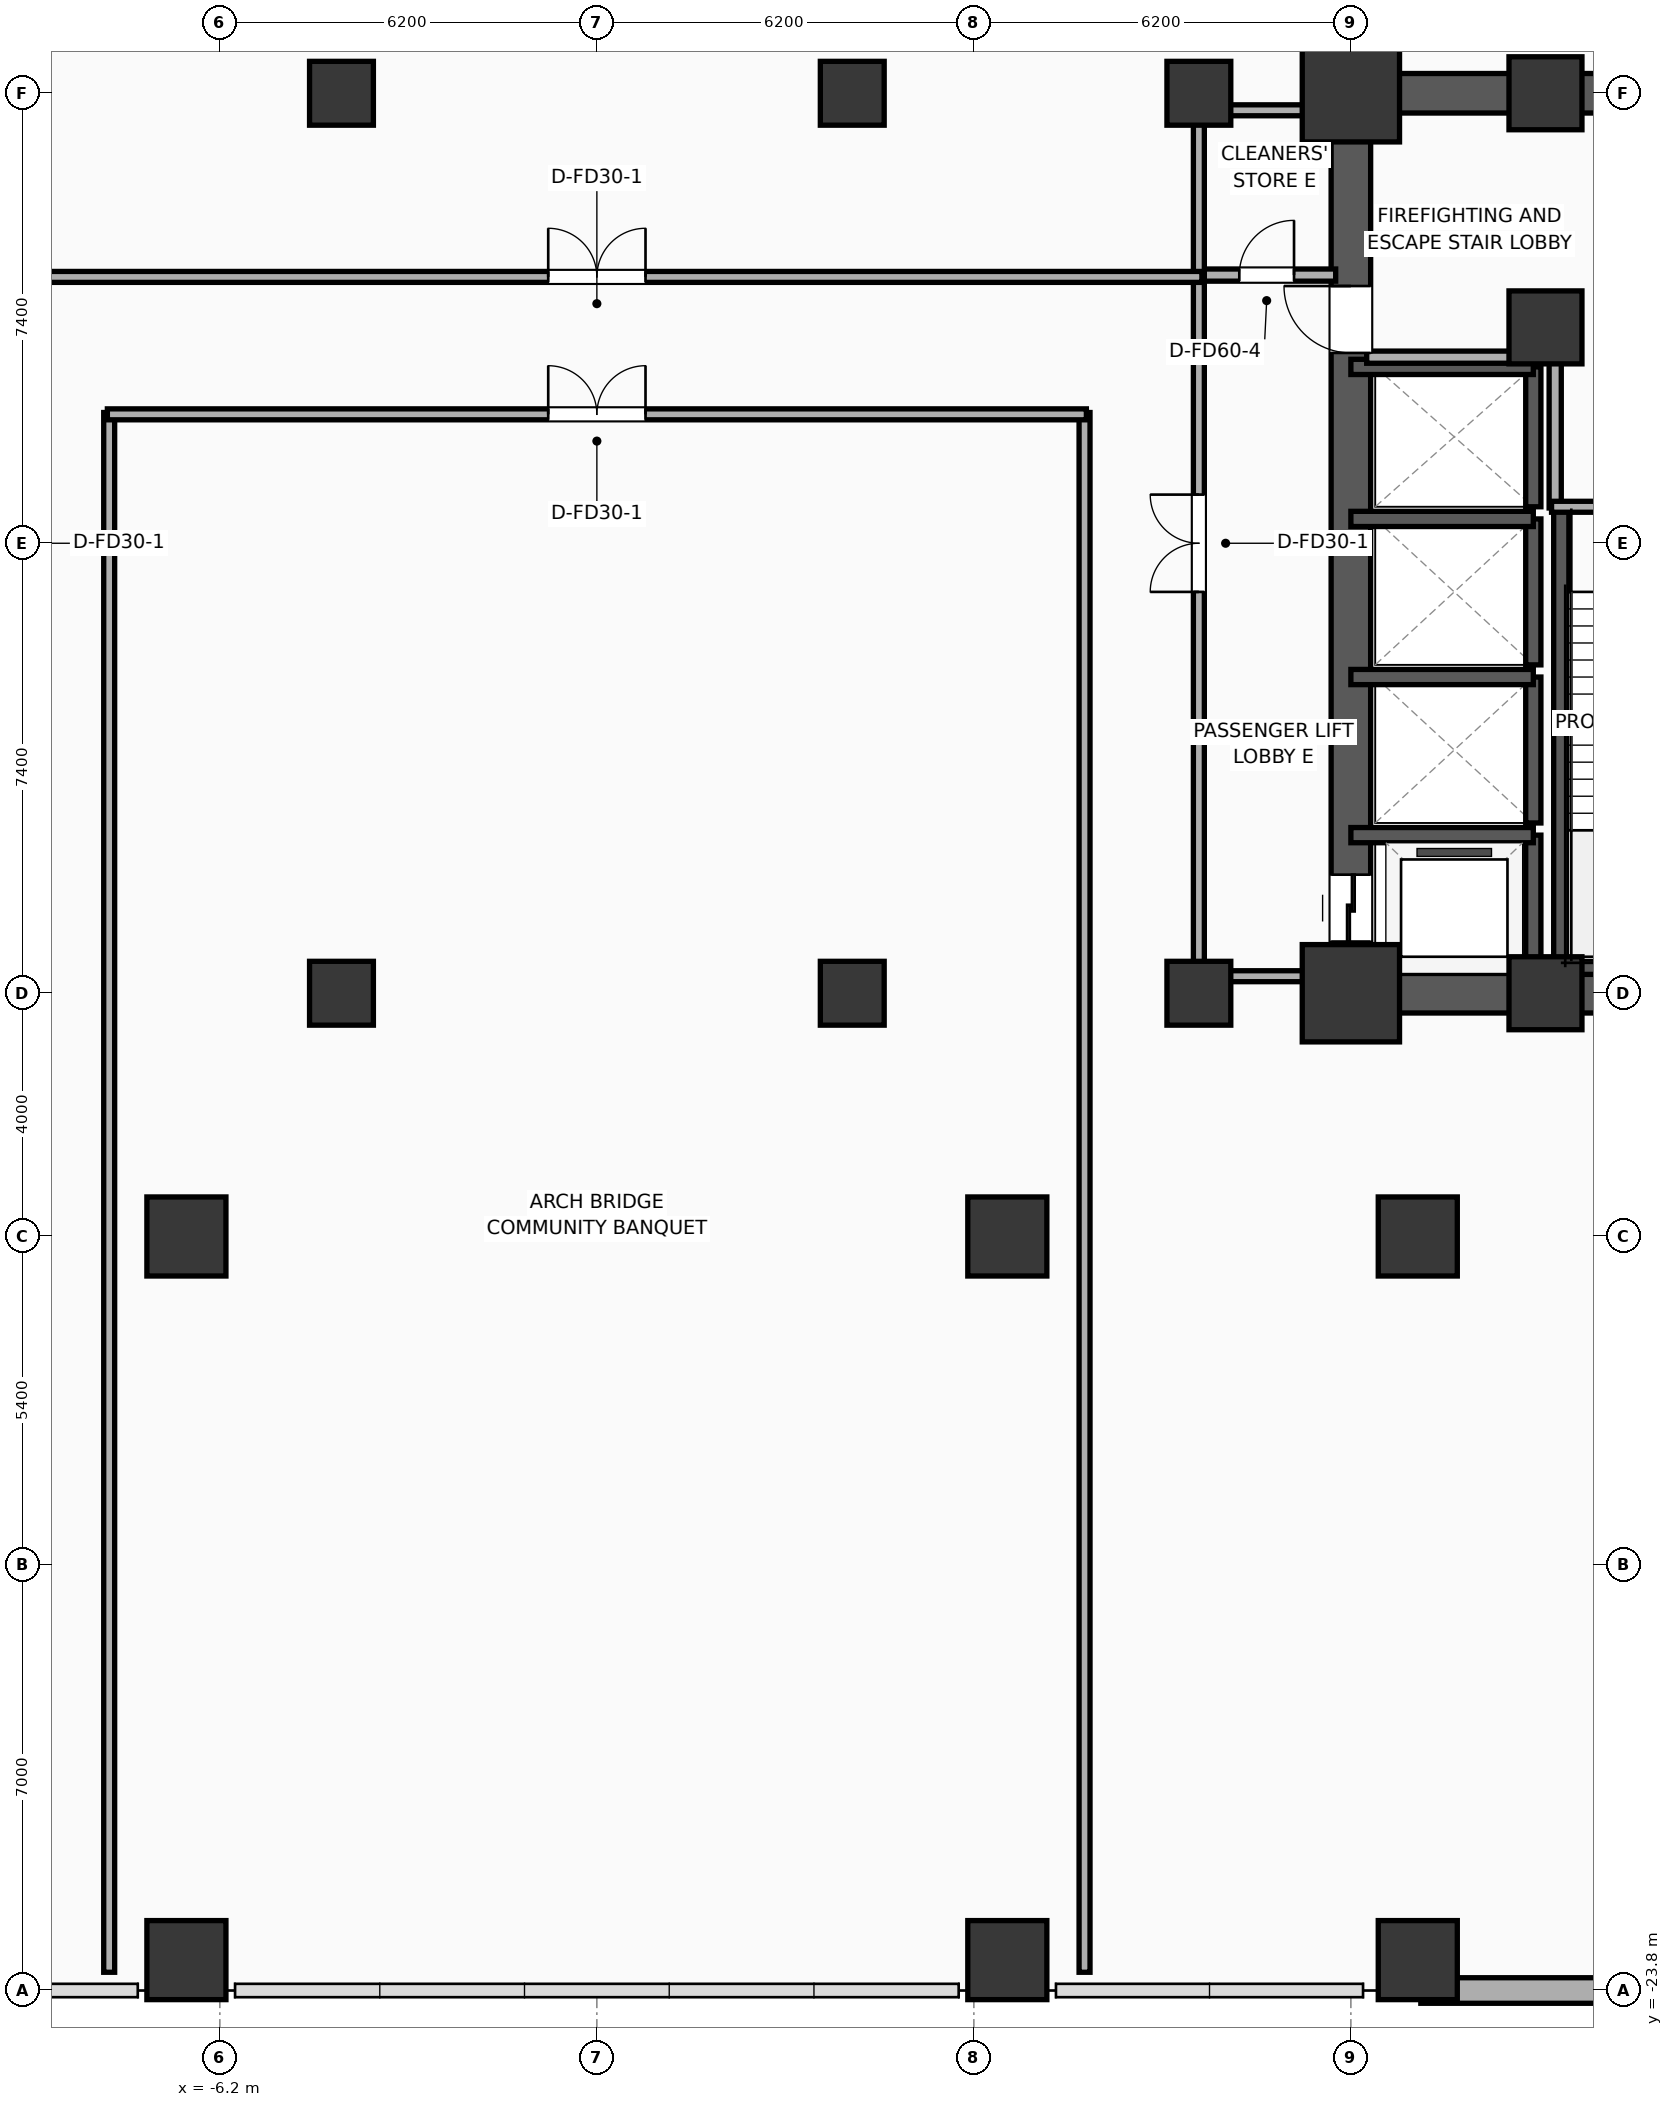
"""IFC4 building model, lengths in metres.
Left out: names, types, materials, properties, quantities, classifications, styles, units other than length and angle.
Written with IfcOpenShell. Run it as: python <this file> out.ifc"""

import sys

from ifc_helpers import new_model, si_unit, direction, frame, frame_2d, origin, origin_2d, place, context, subcontext, project, spatial, rectangle, extrude, element, fill, save


model = new_model("IFC4")
c1 = context("Model", 3, precision=1e-05, world=origin(), true_north=direction((0.0, 1.0)))
c2 = subcontext(c1, "Body", "Model", "MODEL_VIEW")
j1 = project(units=[si_unit("LENGTHUNIT", "METRE"), si_unit("PLANEANGLEUNIT", "RADIAN")], contexts=[c1])
p1 = place(None, origin())
s1 = spatial("IfcSite", under=j1, at=p1, CompositionType="ELEMENT")
p2 = place(p1, origin())
s2 = spatial("IfcBuilding", under=s1, at=p2, CompositionType="ELEMENT")
p3 = place(p2, frame((0.0, 0.0, 20.8)))
s3 = spatial("IfcBuildingStorey", under=s2, at=p3, CompositionType="ELEMENT", Elevation=20.8)
p4 = place(p3, frame((12.4, -7.4, 0.0), z_axis=(0.0, 0.0, 1.0), x_axis=(1.0, 0.0, 0.0)))
e1 = element("IfcColumn", 1, at=p4, inside=s3, PredefinedType="COLUMN", context=c2, shape_type="SweptSolid", body=[
    extrude(rectangle(XDim=1.6, YDim=1.6, at=origin_2d()), origin(), (0.0, 0.0, 1.0), 5.2),
])
p5 = place(p3, frame((15.6, 3.55, 0.0), z_axis=(0.0, 0.0, 1.0), x_axis=(1.0, 0.0, 0.0)))
e2 = element("IfcColumn", 2, at=p5, inside=s3, PredefinedType="COLUMN", context=c2, shape_type="SweptSolid", body=[
    extrude(rectangle(XDim=1.2, YDim=1.2, at=origin_2d()), origin(), (0.0, 0.0, 1.0), 5.2),
])
p6 = place(p3, frame((12.4, 7.4, 0.0), z_axis=(0.0, 0.0, 1.0), x_axis=(1.0, 0.0, 0.0)))
e3 = element("IfcColumn", 3, at=p6, inside=s3, PredefinedType="COLUMN", context=c2, shape_type="SweptSolid", body=[
    extrude(rectangle(XDim=1.6, YDim=1.6, at=origin_2d()), origin(), (0.0, 0.0, 1.0), 5.2),
])
for number, where, z_axis, x_axis in (
    (4, (15.6, -7.4, 0.0), (0.0, 0.0, 1.0), (1.0, 0.0, 0.0)),
    (5, (15.6, 7.4, 0.0), (0.0, 0.0, 1.0), (1.0, 0.0, 0.0)),
):
    element("IfcColumn", number, at=place(p3, frame(where, z_axis=z_axis, x_axis=x_axis)), inside=s3, PredefinedType="COLUMN", context=c2, shape_type="SweptSolid", body=[
        extrude(rectangle(XDim=1.2, YDim=1.2, at=origin_2d()), origin(), (0.0, 0.0, 1.0), 5.2),
    ])
for number, where, z_axis, x_axis in (
    (6, (12.075, -7.4, 0.0), (0.0, 0.0, 1.0), (1.0, 0.0, 0.0)),
    (7, (12.075, 7.4, 0.0), (0.0, 0.0, 1.0), (1.0, 0.0, 0.0)),
):
    element("IfcWall", number, at=place(p3, frame(where, z_axis=z_axis, x_axis=x_axis)), inside=s3, PredefinedType="SHEAR", context=c2, shape_type="SweptSolid", body=[
        extrude(rectangle(XDim=7.45, YDim=0.65, at=frame_2d((3.725, 0.0))), origin(), (0.0, 0.0, 1.0), 4.95),
    ])
p7 = place(p3, frame((12.4, -7.4, 0.0), z_axis=(0.0, 0.0, 1.0), x_axis=(0.0, 1.0, 0.0)))
e8 = element("IfcWall", 8, at=p7, inside=s3, PredefinedType="SHEAR", context=c2, shape_type="SweptSolid", body=[
    extrude(rectangle(XDim=14.8, YDim=0.65, at=frame_2d((7.4, 0.0))), origin(), (0.0, 0.0, 1.0), 4.95),
])
p8 = place(p7, frame((0.85, 0.0, 0.0)))
e9 = element("IfcOpeningElement", 9, at=p8, cuts=e8, PredefinedType="OPENING", context=c2, shape_type="SweptSolid", body=[
    extrude(rectangle(XDim=1.1, YDim=2.05, at=frame_2d((0.55, 1.025))), frame((0.0, 0.335, 0.0), z_axis=(0.0, -1.0, 0.0), x_axis=(1.0, 0.0, 0.0)), (0.0, 0.0, 1.0), 0.67),
])
p9 = place(p7, frame((10.53, 0.0, 0.0)))
e10 = element("IfcOpeningElement", 10, at=p9, cuts=e8, PredefinedType="OPENING", context=c2, shape_type="SweptSolid", body=[
    extrude(rectangle(XDim=1.1, YDim=2.05, at=frame_2d((0.55, 1.025))), frame((0.0, 0.335, 0.0), z_axis=(0.0, -1.0, 0.0), x_axis=(1.0, 0.0, 0.0)), (0.0, 0.0, 1.0), 0.67),
])
p10 = place(p3, frame((15.86, -7.085, 0.0), z_axis=(0.0, 0.0, 1.0), x_axis=(0.0, 1.0, 0.0)))
e11 = element("IfcWall", 11, at=p10, inside=s3, PredefinedType="SOLIDWALL", context=c2, shape_type="SweptSolid", body=[
    extrude(rectangle(XDim=7.685, YDim=0.25, at=frame_2d((3.843, 0.0))), origin(), (0.0, 0.0, 1.0), 4.95),
])
p11 = place(p3, frame((15.74, -6.965, 0.0), z_axis=(0.0, 0.0, 1.0), x_axis=(1.0, 0.0, 0.0)))
e12 = element("IfcWall", 12, at=p11, inside=s3, PredefinedType="SOLIDWALL", context=c2, shape_type="SweptSolid", body=[
    extrude(rectangle(XDim=3.46, YDim=0.25, at=frame_2d((1.73, 0.0))), origin(), (0.0, 0.0, 1.0), 4.95),
])
for number, where, z_axis, x_axis in (
    (13, (-6.75, -23.3, 0.0), (0.0, 0.0, 1.0), (1.0, 0.0, 0.0)),
    (14, (-6.75, -11.4, 0.0), (0.0, 0.0, 1.0), (1.0, 0.0, 0.0)),
    (15, (6.75, -23.3, 0.0), (0.0, 0.0, 1.0), (1.0, 0.0, 0.0)),
    (16, (6.75, -11.4, 0.0), (0.0, 0.0, 1.0), (1.0, 0.0, 0.0)),
    (17, (13.5, -23.3, 0.0), (0.0, 0.0, 1.0), (1.0, 0.0, 0.0)),
    (18, (13.5, -11.4, 0.0), (0.0, 0.0, 1.0), (1.0, 0.0, 0.0)),
):
    element("IfcColumn", number, at=place(p3, frame(where, z_axis=z_axis, x_axis=x_axis)), inside=s3, PredefinedType="COLUMN", context=c2, shape_type="SweptSolid", body=[
        extrude(rectangle(XDim=1.3, YDim=1.3, at=origin_2d()), origin(), (0.0, 0.0, 1.0), 5.2),
    ])
for number, where, z_axis, x_axis in (
    (19, (9.9, -7.4, 0.0), (0.0, 0.0, 1.0), (1.0, 0.0, 0.0)),
    (20, (9.9, 7.4, 0.0), (0.0, 0.0, 1.0), (1.0, 0.0, 0.0)),
    (21, (-4.2, -7.4, 0.0), (0.0, 0.0, 1.0), (1.0, 0.0, 0.0)),
    (22, (-4.2, 7.4, 0.0), (0.0, 0.0, 1.0), (1.0, 0.0, 0.0)),
    (23, (4.2, -7.4, 0.0), (0.0, 0.0, 1.0), (1.0, 0.0, 0.0)),
    (24, (4.2, 7.4, 0.0), (0.0, 0.0, 1.0), (1.0, 0.0, 0.0)),
):
    element("IfcColumn", number, at=place(p3, frame(where, z_axis=z_axis, x_axis=x_axis)), inside=s3, PredefinedType="COLUMN", context=c2, shape_type="SweptSolid", body=[
        extrude(rectangle(XDim=1.05, YDim=1.05, at=origin_2d()), origin(), (0.0, 0.0, 1.0), 5.2),
    ])
p12 = place(p3, frame((13.55, -23.8, 0.0), z_axis=(0.0, 0.0, 1.0), x_axis=(1.0, 0.0, 0.0)))
e25 = element("IfcWall", 25, at=p12, inside=s3, PredefinedType="ELEMENTEDWALL", context=c2, shape_type="SweptSolid", body=[
    extrude(rectangle(XDim=22.05, YDim=0.42, at=frame_2d((11.025, 0.0))), origin(), (0.0, 0.0, 1.0), 3.84),
])
p13 = place(p3, frame((15.4, -7.4, 0.0), z_axis=(0.0, 0.0, 1.0), x_axis=(0.0, 1.0, 0.0)))
e26 = element("IfcWall", 26, at=p13, inside=s3, PredefinedType="SOLIDWALL", context=c2, shape_type="SweptSolid", body=[
    extrude(rectangle(XDim=2.6, YDim=0.25, at=frame_2d((1.3, 0.0))), origin(), (0.0, 0.0, 1.0), 4.95),
])
p14 = place(p3, frame((15.4, -4.8, 0.0), z_axis=(0.0, 0.0, 1.0), x_axis=(-1.0, 0.0, 0.0)))
e27 = element("IfcWall", 27, at=p14, inside=s3, PredefinedType="SOLIDWALL", context=c2, shape_type="SweptSolid", body=[
    extrude(rectangle(XDim=3.0, YDim=0.25, at=frame_2d((1.5, 0.0))), origin(), (0.0, 0.0, 1.0), 4.95),
])
p15 = place(p3, frame((15.4, -4.6, 0.0), z_axis=(0.0, 0.0, 1.0), x_axis=(0.0, 1.0, 0.0)))
e28 = element("IfcWall", 28, at=p15, inside=s3, PredefinedType="SOLIDWALL", context=c2, shape_type="SweptSolid", body=[
    extrude(rectangle(XDim=2.4, YDim=0.25, at=frame_2d((1.2, 0.0))), origin(), (0.0, 0.0, 1.0), 4.95),
])
p16 = place(p3, frame((15.4, -2.2, 0.0), z_axis=(0.0, 0.0, 1.0), x_axis=(-1.0, 0.0, 0.0)))
e29 = element("IfcWall", 29, at=p16, inside=s3, PredefinedType="SOLIDWALL", context=c2, shape_type="SweptSolid", body=[
    extrude(rectangle(XDim=3.0, YDim=0.25, at=frame_2d((1.5, 0.0))), origin(), (0.0, 0.0, 1.0), 4.95),
])
p17 = place(p3, frame((15.4, -2.0, 0.0), z_axis=(0.0, 0.0, 1.0), x_axis=(0.0, 1.0, 0.0)))
e30 = element("IfcWall", 30, at=p17, inside=s3, PredefinedType="SOLIDWALL", context=c2, shape_type="SweptSolid", body=[
    extrude(rectangle(XDim=2.4, YDim=0.25, at=frame_2d((1.2, 0.0))), origin(), (0.0, 0.0, 1.0), 4.95),
])
p18 = place(p3, frame((15.4, 0.4, 0.0), z_axis=(0.0, 0.0, 1.0), x_axis=(-1.0, 0.0, 0.0)))
e31 = element("IfcWall", 31, at=p18, inside=s3, PredefinedType="SOLIDWALL", context=c2, shape_type="SweptSolid", body=[
    extrude(rectangle(XDim=3.0, YDim=0.25, at=frame_2d((1.5, 0.0))), origin(), (0.0, 0.0, 1.0), 4.95),
])
p19 = place(p3, frame((15.4, 0.6, 0.0), z_axis=(0.0, 0.0, 1.0), x_axis=(0.0, 1.0, 0.0)))
e32 = element("IfcWall", 32, at=p19, inside=s3, PredefinedType="SOLIDWALL", context=c2, shape_type="SweptSolid", body=[
    extrude(rectangle(XDim=2.3, YDim=0.25, at=frame_2d((1.15, 0.0))), origin(), (0.0, 0.0, 1.0), 4.95),
])
p20 = place(p3, frame((15.4, 2.9, 0.0), z_axis=(0.0, 0.0, 1.0), x_axis=(-1.0, 0.0, 0.0)))
e33 = element("IfcWall", 33, at=p20, inside=s3, PredefinedType="SOLIDWALL", context=c2, shape_type="SweptSolid", body=[
    extrude(rectangle(XDim=3.0, YDim=0.25, at=frame_2d((1.5, 0.0))), origin(), (0.0, 0.0, 1.0), 4.95),
])
p21 = place(p3, frame((15.76, 0.58, 0.0), z_axis=(0.0, 0.0, 1.0), x_axis=(0.0, 1.0, 0.0)))
e34 = element("IfcWall", 34, at=p21, inside=s3, PredefinedType="PARTITIONING", context=c2, shape_type="SweptSolid", body=[
    extrude(rectangle(XDim=2.52, YDim=0.2, at=frame_2d((1.26, 0.0))), origin(), (0.0, 0.0, 1.0), 4.95),
])
p22 = place(p3, frame((12.66, 3.06, 0.0), z_axis=(0.0, 0.0, 1.0), x_axis=(1.0, 0.0, 0.0)))
e35 = element("IfcWall", 35, at=p22, inside=s3, PredefinedType="PARTITIONING", context=c2, shape_type="SweptSolid", body=[
    extrude(rectangle(XDim=3.16, YDim=0.2, at=frame_2d((1.58, 0.0))), origin(), (0.0, 0.0, 1.0), 4.95),
])
p23 = place(p3, frame((15.7, 0.6, 0.0), z_axis=(0.0, 0.0, 1.0), x_axis=(1.0, 0.0, 0.0)))
e36 = element("IfcWall", 36, at=p23, inside=s3, PredefinedType="PARTITIONING", context=c2, shape_type="SweptSolid", body=[
    extrude(rectangle(XDim=3.36, YDim=0.18, at=frame_2d((1.68, 0.0))), origin(), (0.0, 0.0, 1.0), 4.95),
])
p24 = place(p23, frame((1.155, 0.0, 0.0)))
e37 = element("IfcOpeningElement", 37, at=p24, cuts=e36, PredefinedType="OPENING", context=c2, shape_type="SweptSolid", body=[
    extrude(rectangle(XDim=1.05, YDim=2.05, at=frame_2d((0.525, 1.025))), frame((0.0, 0.1, 0.0), z_axis=(0.0, -1.0, 0.0), x_axis=(1.0, 0.0, 0.0)), (0.0, 0.0, 1.0), 0.2),
])
p25 = place(p3, frame((9.88, 4.41, 0.0), z_axis=(0.0, 0.0, 1.0), x_axis=(1.0, 0.0, 0.0)))
e38 = element("IfcWall", 38, at=p25, inside=s3, PredefinedType="PARTITIONING", context=c2, shape_type="SweptSolid", body=[
    extrude(rectangle(XDim=2.27, YDim=0.2, at=frame_2d((1.135, 0.0))), origin(), (0.0, 0.0, 1.0), 4.95),
])
p26 = place(p25, frame((0.685, 0.0, 0.0)))
e39 = element("IfcOpeningElement", 39, at=p26, cuts=e38, PredefinedType="OPENING", context=c2, shape_type="SweptSolid", body=[
    extrude(rectangle(XDim=0.9, YDim=2.05, at=frame_2d((0.45, 1.025))), frame((0.0, 0.11, 0.0), z_axis=(0.0, -1.0, 0.0), x_axis=(1.0, 0.0, 0.0)), (0.0, 0.0, 1.0), 0.22),
])
for number, where, z_axis, x_axis in (
    (40, (9.88, 7.12, 0.0), (0.0, 0.0, 1.0), (1.0, 0.0, 0.0)),
    (41, (9.88, -7.12, 0.0), (0.0, 0.0, 1.0), (1.0, 0.0, 0.0)),
):
    element("IfcWall", number, at=place(p3, frame(where, z_axis=z_axis, x_axis=x_axis)), inside=s3, PredefinedType="PARTITIONING", context=c2, shape_type="SweptSolid", body=[
        extrude(rectangle(XDim=2.27, YDim=0.18, at=frame_2d((1.135, 0.0))), origin(), (0.0, 0.0, 1.0), 4.95),
    ])
p27 = place(p3, frame((9.9, -7.12, 0.0), z_axis=(0.0, 0.0, 1.0), x_axis=(0.0, 1.0, 0.0)))
e42 = element("IfcWall", 42, at=p27, inside=s3, PredefinedType="PARTITIONING", context=c2, shape_type="SweptSolid", body=[
    extrude(rectangle(XDim=14.24, YDim=0.18, at=frame_2d((7.12, 0.0))), origin(), (0.0, 0.0, 1.0), 4.95),
])
p28 = place(p27, frame((6.32, 0.0, 0.0)))
e43 = element("IfcOpeningElement", 43, at=p28, cuts=e42, PredefinedType="OPENING", context=c2, shape_type="SweptSolid", body=[
    extrude(rectangle(XDim=1.6, YDim=2.05, at=frame_2d((0.8, 1.025))), frame((0.0, 0.1, 0.0), z_axis=(0.0, -1.0, 0.0), x_axis=(1.0, 0.0, 0.0)), (0.0, 0.0, 1.0), 0.2),
])
for number, where, z_axis, x_axis in (
    (44, (-8.02, -23.5, 0.0), (0.0, 0.0, 1.0), (0.0, 1.0, 0.0)),
    (45, (8.02, -23.5, 0.0), (0.0, 0.0, 1.0), (0.0, 1.0, 0.0)),
):
    element("IfcWall", number, at=place(p3, frame(where, z_axis=z_axis, x_axis=x_axis)), inside=s3, PredefinedType="PARTITIONING", context=c2, shape_type="SweptSolid", body=[
        extrude(rectangle(XDim=25.65, YDim=0.18, at=frame_2d((12.825, 0.0))), origin(), (0.0, 0.0, 1.0), 4.95),
    ])
p29 = place(p3, frame((-8.05, 2.12, 0.0), z_axis=(0.0, 0.0, 1.0), x_axis=(1.0, 0.0, 0.0)))
e46 = element("IfcWall", 46, at=p29, inside=s3, PredefinedType="PARTITIONING", context=c2, shape_type="SweptSolid", body=[
    extrude(rectangle(XDim=16.1, YDim=0.18, at=frame_2d((8.05, 0.0))), origin(), (0.0, 0.0, 1.0), 4.95),
])
p30 = place(p29, frame((7.25, 0.0, 0.0)))
e47 = element("IfcOpeningElement", 47, at=p30, cuts=e46, PredefinedType="OPENING", context=c2, shape_type="SweptSolid", body=[
    extrude(rectangle(XDim=1.6, YDim=2.05, at=frame_2d((0.8, 1.025))), frame((0.0, 0.1, 0.0), z_axis=(0.0, -1.0, 0.0), x_axis=(1.0, 0.0, 0.0)), (0.0, 0.0, 1.0), 0.2),
])
p31 = place(p3, frame((-9.95, 4.38, 0.0), z_axis=(0.0, 0.0, 1.0), x_axis=(1.0, 0.0, 0.0)))
e48 = element("IfcWall", 48, at=p31, inside=s3, PredefinedType="PARTITIONING", context=c2, shape_type="SweptSolid", body=[
    extrude(rectangle(XDim=19.9, YDim=0.18, at=frame_2d((9.95, 0.0))), origin(), (0.0, 0.0, 1.0), 4.95),
])
p32 = place(p31, frame((9.15, 0.0, 0.0)))
e49 = element("IfcOpeningElement", 49, at=p32, cuts=e48, PredefinedType="OPENING", context=c2, shape_type="SweptSolid", body=[
    extrude(rectangle(XDim=1.6, YDim=2.05, at=frame_2d((0.8, 1.025))), frame((0.0, 0.1, 0.0), z_axis=(0.0, -1.0, 0.0), x_axis=(1.0, 0.0, 0.0)), (0.0, 0.0, 1.0), 0.2),
])
p33 = place(p8, origin())
e50 = element("IfcDoor", 50, at=p33, inside=s3, OperationType="SLIDING_TO_LEFT", PredefinedType="DOOR", context=c2, shape_type="SweptSolid", body=[
    extrude(rectangle(XDim=1.1, YDim=2.05, at=frame_2d((0.55, 1.025))), frame((0.0, 0.025, 0.0), z_axis=(0.0, -1.0, 0.0), x_axis=(1.0, 0.0, 0.0)), (0.0, 0.0, 1.0), 0.05),
])
fill(e9, e50)
p34 = place(p26, origin())
e51 = element("IfcDoor", 51, at=p34, inside=s3, OperationType="SINGLE_SWING_RIGHT", PredefinedType="DOOR", context=c2, shape_type="SweptSolid", body=[
    extrude(rectangle(XDim=0.9, YDim=2.05, at=frame_2d((0.45, 1.025))), frame((0.0, 0.025, 0.0), z_axis=(0.0, -1.0, 0.0), x_axis=(1.0, 0.0, 0.0)), (0.0, 0.0, 1.0), 0.05),
])
fill(e39, e51)
p35 = place(p28, origin())
e52 = element("IfcDoor", 52, at=p35, inside=s3, OperationType="DOUBLE_DOOR_SINGLE_SWING", PredefinedType="DOOR", context=c2, shape_type="SweptSolid", body=[
    extrude(rectangle(XDim=1.6, YDim=2.05, at=frame_2d((0.8, 1.025))), frame((0.0, 0.025, 0.0), z_axis=(0.0, -1.0, 0.0), x_axis=(1.0, 0.0, 0.0)), (0.0, 0.0, 1.0), 0.05),
])
fill(e43, e52)
p36 = place(p30, origin())
e53 = element("IfcDoor", 53, at=p36, inside=s3, OperationType="DOUBLE_DOOR_SINGLE_SWING", PredefinedType="DOOR", context=c2, shape_type="SweptSolid", body=[
    extrude(rectangle(XDim=1.6, YDim=2.05, at=frame_2d((0.8, 1.025))), frame((0.0, 0.025, 0.0), z_axis=(0.0, -1.0, 0.0), x_axis=(1.0, 0.0, 0.0)), (0.0, 0.0, 1.0), 0.05),
])
fill(e47, e53)
p37 = place(p32, origin())
e54 = element("IfcDoor", 54, at=p37, inside=s3, OperationType="DOUBLE_DOOR_SINGLE_SWING", PredefinedType="DOOR", context=c2, shape_type="SweptSolid", body=[
    extrude(rectangle(XDim=1.6, YDim=2.05, at=frame_2d((0.8, 1.025))), frame((0.0, 0.025, 0.0), z_axis=(0.0, -1.0, 0.0), x_axis=(1.0, 0.0, 0.0)), (0.0, 0.0, 1.0), 0.05),
])
fill(e49, e54)
p38 = place(p9, origin())
e55 = element("IfcDoor", 55, at=p38, inside=s3, OperationType="SINGLE_SWING_RIGHT", PredefinedType="DOOR", context=c2, shape_type="SweptSolid", body=[
    extrude(rectangle(XDim=1.1, YDim=2.05, at=frame_2d((0.55, 1.025))), frame((0.0, 0.025, 0.0), z_axis=(0.0, -1.0, 0.0), x_axis=(1.0, 0.0, 0.0)), (0.0, 0.0, 1.0), 0.05),
])
fill(e10, e55)
save(model, sys.argv[1])
